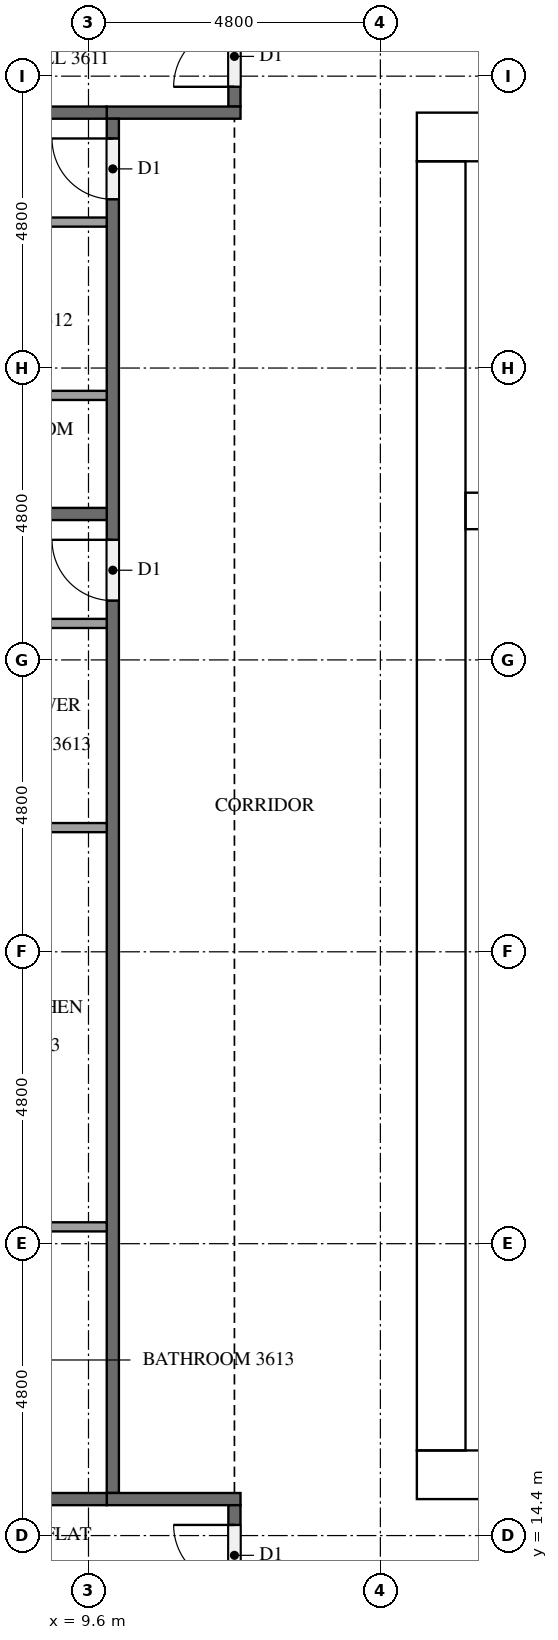
"""IFC4 building model, lengths in metres.
Left out: names, types, materials, properties, quantities, classifications, styles, units other than length and angle.
Written with IfcOpenShell. Run it as: python <this file> out.ifc"""

import sys

from ifc_helpers import new_model, si_unit, direction, frame, frame_2d, origin, place, context, subcontext, project, spatial, rectangle, extrude, element, fill, save


model = new_model("IFC4")
c1 = context("Model", 3, precision=1e-05, world=origin(), true_north=direction((0.0, 1.0)))
c2 = subcontext(c1, "Body", "Model", "MODEL_VIEW")
j1 = project(units=[si_unit("LENGTHUNIT", "METRE"), si_unit("PLANEANGLEUNIT", "RADIAN")], contexts=[c1])
p1 = place(None, origin())
s1 = spatial("IfcSite", under=j1, at=p1, CompositionType="ELEMENT")
p2 = place(p1, origin())
s2 = spatial("IfcBuilding", under=s1, at=p2, CompositionType="ELEMENT")
p3 = place(p2, frame((0.0, 0.0, 140.1)))
s3 = spatial("IfcBuildingStorey", under=s2, at=p3, CompositionType="ELEMENT", Elevation=140.1)
p4 = place(p3, frame((15.0, 15.4, 0.0), z_axis=(0.0, 0.0, 1.0), x_axis=(1.0, 0.0, 0.0)))
e1 = element("IfcWall", 1, at=p4, inside=s3, PredefinedType="SHEAR", context=c2, shape_type="SweptSolid", body=[
    extrude(rectangle(XDim=32.4, YDim=0.8, at=frame_2d((16.2, 0.0))), origin(), (0.0, 0.0, 1.0), 3.1),
])
p5 = place(p4, frame((15.3, 0.0, 0.0)))
e2 = element("IfcOpeningElement", 2, at=p5, cuts=e1, PredefinedType="OPENING", context=c2, shape_type="SweptSolid", body=[
    extrude(rectangle(XDim=1.8, YDim=2.1, at=frame_2d((0.9, 1.05))), frame((0.0, 0.41, 0.0), z_axis=(0.0, -1.0, 0.0), x_axis=(1.0, 0.0, 0.0)), (0.0, 0.0, 1.0), 0.82),
])
p6 = place(p3, frame((15.0, 37.4, 0.0), z_axis=(0.0, 0.0, 1.0), x_axis=(1.0, 0.0, 0.0)))
e3 = element("IfcWall", 3, at=p6, inside=s3, PredefinedType="SHEAR", context=c2, shape_type="SweptSolid", body=[
    extrude(rectangle(XDim=32.4, YDim=0.8, at=frame_2d((16.2, 0.0))), origin(), (0.0, 0.0, 1.0), 3.1),
])
p7 = place(p6, frame((15.3, 0.0, 0.0)))
e4 = element("IfcOpeningElement", 4, at=p7, cuts=e3, PredefinedType="OPENING", context=c2, shape_type="SweptSolid", body=[
    extrude(rectangle(XDim=1.8, YDim=2.1, at=frame_2d((0.9, 1.05))), frame((0.0, 0.41, 0.0), z_axis=(0.0, -1.0, 0.0), x_axis=(1.0, 0.0, 0.0)), (0.0, 0.0, 1.0), 0.82),
])
p8 = place(p6, frame((1.51, 0.0, 0.0)))
e5 = element("IfcOpeningElement", 5, at=p8, cuts=e3, PredefinedType="OPENING", context=c2, shape_type="SweptSolid", body=[
    extrude(rectangle(XDim=1.0, YDim=2.1, at=frame_2d((0.5, 1.05))), frame((0.0, 0.41, 0.0), z_axis=(0.0, -1.0, 0.0), x_axis=(1.0, 0.0, 0.0)), (0.0, 0.0, 1.0), 0.82),
])
p9 = place(p6, frame((5.11, 0.0, 0.0)))
e6 = element("IfcOpeningElement", 6, at=p9, cuts=e3, PredefinedType="OPENING", context=c2, shape_type="SweptSolid", body=[
    extrude(rectangle(XDim=1.0, YDim=2.1, at=frame_2d((0.5, 1.05))), frame((0.0, 0.41, 0.0), z_axis=(0.0, -1.0, 0.0), x_axis=(1.0, 0.0, 0.0)), (0.0, 0.0, 1.0), 0.82),
])
p10 = place(p3, frame((15.4, 15.8, 0.0), z_axis=(0.0, 0.0, 1.0), x_axis=(0.0, 1.0, 0.0)))
e7 = element("IfcWall", 7, at=p10, inside=s3, PredefinedType="SHEAR", context=c2, shape_type="SweptSolid", body=[
    extrude(rectangle(XDim=21.2, YDim=0.8, at=frame_2d((10.6, 0.0))), origin(), (0.0, 0.0, 1.0), 3.1),
])
p11 = place(p10, frame((4.96, 0.0, 0.0)))
e8 = element("IfcOpeningElement", 8, at=p11, cuts=e7, PredefinedType="OPENING", context=c2, shape_type="SweptSolid", body=[
    extrude(rectangle(XDim=1.2, YDim=2.1, at=frame_2d((0.6, 1.05))), frame((0.0, 0.41, 0.0), z_axis=(0.0, -1.0, 0.0), x_axis=(1.0, 0.0, 0.0)), (0.0, 0.0, 1.0), 0.82),
])
p12 = place(p3, frame((15.8, 31.25, 0.0), z_axis=(0.0, 0.0, 1.0), x_axis=(1.0, 0.0, 0.0)))
e9 = element("IfcWall", 9, at=p12, inside=s3, PredefinedType="SHEAR", context=c2, shape_type="SweptSolid", body=[
    extrude(rectangle(XDim=7.0, YDim=0.6, at=frame_2d((3.5, 0.0))), origin(), (0.0, 0.0, 1.0), 3.1),
])
p13 = place(p3, frame((12.0, 37.9, 0.0), z_axis=(0.0, 0.0, 1.0), x_axis=(0.0, 1.0, 0.0)))
e10 = element("IfcWall", 10, at=p13, inside=s3, PredefinedType="PARTITIONING", context=c2, shape_type="SweptSolid", body=[
    extrude(rectangle(XDim=2.8, YDim=0.2, at=frame_2d((1.4, 0.0))), origin(), (0.0, 0.0, 1.0), 3.1),
])
p14 = place(p13, frame((0.325, 0.0, 0.0)))
e11 = element("IfcOpeningElement", 11, at=p14, cuts=e10, PredefinedType="OPENING", context=c2, shape_type="SweptSolid", body=[
    extrude(rectangle(XDim=1.0, YDim=2.1, at=frame_2d((0.5, 1.05))), frame((0.0, 0.11, 0.0), z_axis=(0.0, -1.0, 0.0), x_axis=(1.0, 0.0, 0.0)), (0.0, 0.0, 1.0), 0.22),
])
p15 = place(p3, frame((12.1, 37.8, 0.0), z_axis=(0.0, 0.0, 1.0), x_axis=(-1.0, 0.0, 0.0)))
e12 = element("IfcWall", 12, at=p15, inside=s3, PredefinedType="PARTITIONING", context=c2, shape_type="SweptSolid", body=[
    extrude(rectangle(XDim=2.2, YDim=0.2, at=frame_2d((1.1, 0.0))), origin(), (0.0, 0.0, 1.0), 3.1),
])
p16 = place(p3, frame((10.0, 15.1, 0.0), z_axis=(0.0, 0.0, 1.0), x_axis=(0.0, 1.0, 0.0)))
e13 = element("IfcWall", 13, at=p16, inside=s3, PredefinedType="PARTITIONING", context=c2, shape_type="SweptSolid", body=[
    extrude(rectangle(XDim=22.6, YDim=0.2, at=frame_2d((11.3, 0.0))), origin(), (0.0, 0.0, 1.0), 3.1),
])
p17 = place(p16, frame((21.275, 0.0, 0.0)))
e14 = element("IfcOpeningElement", 14, at=p17, cuts=e13, PredefinedType="OPENING", context=c2, shape_type="SweptSolid", body=[
    extrude(rectangle(XDim=1.0, YDim=2.1, at=frame_2d((0.5, 1.05))), frame((0.0, 0.11, 0.0), z_axis=(0.0, -1.0, 0.0), x_axis=(1.0, 0.0, 0.0)), (0.0, 0.0, 1.0), 0.22),
])
p18 = place(p16, frame((14.675, 0.0, 0.0)))
e15 = element("IfcOpeningElement", 15, at=p18, cuts=e13, PredefinedType="OPENING", context=c2, shape_type="SweptSolid", body=[
    extrude(rectangle(XDim=1.0, YDim=2.1, at=frame_2d((0.5, 1.05))), frame((0.0, 0.11, 0.0), z_axis=(0.0, -1.0, 0.0), x_axis=(1.0, 0.0, 0.0)), (0.0, 0.0, 1.0), 0.22),
])
p19 = place(p3, frame((9.9, 15.0, 0.0), z_axis=(0.0, 0.0, 1.0), x_axis=(1.0, 0.0, 0.0)))
e16 = element("IfcWall", 16, at=p19, inside=s3, PredefinedType="PARTITIONING", context=c2, shape_type="SweptSolid", body=[
    extrude(rectangle(XDim=2.2, YDim=0.2, at=frame_2d((1.1, 0.0))), origin(), (0.0, 0.0, 1.0), 3.1),
])
p20 = place(p3, frame((12.0, 12.1, 0.0), z_axis=(0.0, 0.0, 1.0), x_axis=(0.0, 1.0, 0.0)))
e17 = element("IfcWall", 17, at=p20, inside=s3, PredefinedType="PARTITIONING", context=c2, shape_type="SweptSolid", body=[
    extrude(rectangle(XDim=2.8, YDim=0.2, at=frame_2d((1.4, 0.0))), origin(), (0.0, 0.0, 1.0), 3.1),
])
p21 = place(p20, frame((1.475, 0.0, 0.0)))
e18 = element("IfcOpeningElement", 18, at=p21, cuts=e17, PredefinedType="OPENING", context=c2, shape_type="SweptSolid", body=[
    extrude(rectangle(XDim=1.0, YDim=2.1, at=frame_2d((0.5, 1.05))), frame((0.0, 0.11, 0.0), z_axis=(0.0, -1.0, 0.0), x_axis=(1.0, 0.0, 0.0)), (0.0, 0.0, 1.0), 0.22),
])
p22 = place(p3, frame((0.375, 37.8, 0.0), z_axis=(0.0, 0.0, 1.0), x_axis=(1.0, 0.0, 0.0)))
e19 = element("IfcWall", 19, at=p22, inside=s3, PredefinedType="PARTITIONING", context=c2, shape_type="SweptSolid", body=[
    extrude(rectangle(XDim=9.525, YDim=0.2, at=frame_2d((4.762, 0.0))), origin(), (0.0, 0.0, 1.0), 3.1),
])
for number, where, z_axis, x_axis in (
    (20, (0.1, 31.2, 0.0), (0.0, 0.0, 1.0), (1.0, 0.0, 0.0)),
    (21, (0.1, 15.0, 0.0), (0.0, 0.0, 1.0), (1.0, 0.0, 0.0)),
):
    element("IfcWall", number, at=place(p3, frame(where, z_axis=z_axis, x_axis=x_axis)), inside=s3, PredefinedType="PARTITIONING", context=c2, shape_type="SweptSolid", body=[
        extrude(rectangle(XDim=9.8, YDim=0.2, at=frame_2d((4.9, 0.0))), origin(), (0.0, 0.0, 1.0), 3.1),
    ])
p23 = place(p3, frame((9.9, 33.15, 0.0), z_axis=(0.0, 0.0, 1.0), x_axis=(-1.0, 0.0, 0.0)))
e22 = element("IfcWall", 22, at=p23, inside=s3, PredefinedType="PARTITIONING", context=c2, shape_type="SweptSolid", body=[
    extrude(rectangle(XDim=2.925, YDim=0.15, at=frame_2d((1.462, 0.0))), origin(), (0.0, 0.0, 1.0), 3.1),
])
p24 = place(p3, frame((9.9, 36.0, 0.0), z_axis=(0.0, 0.0, 1.0), x_axis=(-1.0, 0.0, 0.0)))
e23 = element("IfcWall", 23, at=p24, inside=s3, PredefinedType="PARTITIONING", context=c2, shape_type="SweptSolid", body=[
    extrude(rectangle(XDim=3.075, YDim=0.15, at=frame_2d((1.538, 0.0))), origin(), (0.0, 0.0, 1.0), 3.1),
])
for number, where, z_axis, x_axis in (
    (24, (9.9, 26.042, 0.0), (0.0, 0.0, 1.0), (-1.0, 0.0, 0.0)),
    (25, (9.9, 19.477, 0.0), (0.0, 0.0, 1.0), (-1.0, 0.0, 0.0)),
):
    element("IfcWall", number, at=place(p3, frame(where, z_axis=z_axis, x_axis=x_axis)), inside=s3, PredefinedType="PARTITIONING", context=c2, shape_type="SweptSolid", body=[
        extrude(rectangle(XDim=2.175, YDim=0.15, at=frame_2d((1.087, 0.0))), origin(), (0.0, 0.0, 1.0), 3.1),
    ])
p25 = place(p3, frame((9.9, 29.4, 0.0), z_axis=(0.0, 0.0, 1.0), x_axis=(-1.0, 0.0, 0.0)))
e26 = element("IfcWall", 26, at=p25, inside=s3, PredefinedType="PARTITIONING", context=c2, shape_type="SweptSolid", body=[
    extrude(rectangle(XDim=2.325, YDim=0.15, at=frame_2d((1.163, 0.0))), origin(), (0.0, 0.0, 1.0), 3.1),
])
p26 = place(p11, frame((1.2, 0.0, 0.0), z_axis=(0.0, 0.0, 1.0), x_axis=(-1.0, 0.0, 0.0)))
e27 = element("IfcDoor", 27, at=p26, inside=s3, OperationType="SINGLE_SWING_LEFT", PredefinedType="DOOR", context=c2, shape_type="SweptSolid", body=[
    extrude(rectangle(XDim=1.2, YDim=2.1, at=frame_2d((0.6, 1.05))), frame((0.0, 0.025, 0.0), z_axis=(0.0, -1.0, 0.0), x_axis=(1.0, 0.0, 0.0)), (0.0, 0.0, 1.0), 0.05),
])
fill(e8, e27)
p27 = place(p14, origin())
e28 = element("IfcDoor", 28, at=p27, inside=s3, OperationType="SINGLE_SWING_LEFT", PredefinedType="DOOR", context=c2, shape_type="SweptSolid", body=[
    extrude(rectangle(XDim=1.0, YDim=2.1, at=frame_2d((0.5, 1.05))), frame((0.0, 0.025, 0.0), z_axis=(0.0, -1.0, 0.0), x_axis=(1.0, 0.0, 0.0)), (0.0, 0.0, 1.0), 0.05),
])
fill(e11, e28)
p28 = place(p17, origin())
e29 = element("IfcDoor", 29, at=p28, inside=s3, OperationType="SINGLE_SWING_RIGHT", PredefinedType="DOOR", context=c2, shape_type="SweptSolid", body=[
    extrude(rectangle(XDim=1.0, YDim=2.1, at=frame_2d((0.5, 1.05))), frame((0.0, 0.025, 0.0), z_axis=(0.0, -1.0, 0.0), x_axis=(1.0, 0.0, 0.0)), (0.0, 0.0, 1.0), 0.05),
])
fill(e14, e29)
p29 = place(p18, origin())
e30 = element("IfcDoor", 30, at=p29, inside=s3, OperationType="SINGLE_SWING_RIGHT", PredefinedType="DOOR", context=c2, shape_type="SweptSolid", body=[
    extrude(rectangle(XDim=1.0, YDim=2.1, at=frame_2d((0.5, 1.05))), frame((0.0, 0.025, 0.0), z_axis=(0.0, -1.0, 0.0), x_axis=(1.0, 0.0, 0.0)), (0.0, 0.0, 1.0), 0.05),
])
fill(e15, e30)
p30 = place(p21, origin())
e31 = element("IfcDoor", 31, at=p30, inside=s3, OperationType="SINGLE_SWING_RIGHT", PredefinedType="DOOR", context=c2, shape_type="SweptSolid", body=[
    extrude(rectangle(XDim=1.0, YDim=2.1, at=frame_2d((0.5, 1.05))), frame((0.0, 0.025, 0.0), z_axis=(0.0, -1.0, 0.0), x_axis=(1.0, 0.0, 0.0)), (0.0, 0.0, 1.0), 0.05),
])
fill(e18, e31)
save(model, sys.argv[1])
